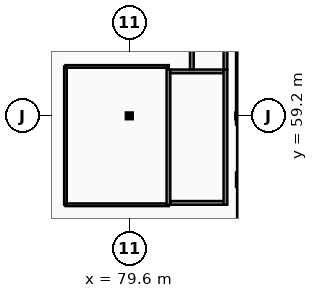
"""IFC4 building model, lengths in metres.
Left out: names, types, materials, properties, quantities, classifications, styles, units other than length and angle.
Written with IfcOpenShell. Run it as: python <this file> out.ifc"""

import sys

from ifc_helpers import new_model, si_unit, direction, frame, frame_2d, origin, origin_2d, place, context, subcontext, project, spatial, rectangle, i_section, extrude, element, fill, save


model = new_model("IFC4")
c1 = context("Model", 3, precision=1e-05, world=origin(), true_north=direction((0.0, 1.0)))
c2 = subcontext(c1, "Body", "Model", "MODEL_VIEW")
j1 = project(units=[si_unit("LENGTHUNIT", "METRE"), si_unit("PLANEANGLEUNIT", "RADIAN")], contexts=[c1])
p1 = place(None, origin())
s1 = spatial("IfcSite", under=j1, at=p1, CompositionType="ELEMENT")
p2 = place(p1, origin())
s2 = spatial("IfcBuilding", under=s1, at=p2, CompositionType="ELEMENT")
p3 = place(p2, frame((0.0, 0.0, 21.6)))
s3 = spatial("IfcBuildingStorey", under=s2, at=p3, CompositionType="ELEMENT", Elevation=21.6)
for number, where, z_axis, x_axis in (
    (1, (79.6, 59.2, 0.0), (0.0, 0.0, 1.0), (1.0, 0.0, 0.0)),
    (2, (86.8, 59.2, 0.0), (0.0, 0.0, 1.0), (1.0, 0.0, 0.0)),
):
    element("IfcColumn", number, at=place(p3, frame(where, z_axis=z_axis, x_axis=x_axis)), inside=s3, PredefinedType="COLUMN", context=c2, shape_type="SweptSolid", body=[
        extrude(i_section(OverallWidth=0.3, OverallDepth=0.29, WebThickness=0.009, FlangeThickness=0.014, at=origin_2d()), origin(), (0.0, 0.0, 1.0), 3.6),
    ])
p4 = place(p3, frame((75.4, 53.35, 0.0), z_axis=(0.0, 0.0, 1.0), x_axis=(1.0, 0.0, 0.0)))
e3 = element("IfcWall", 3, at=p4, inside=s3, PredefinedType="PARTITIONING", context=c2, shape_type="SweptSolid", body=[
    extrude(rectangle(XDim=6.8, YDim=0.18, at=frame_2d((3.4, 0.0))), origin(), (0.0, 0.0, 1.0), 2.79),
])
p5 = place(p3, frame((75.4, 53.35, 0.0), z_axis=(0.0, 0.0, 1.0), x_axis=(0.0, 1.0, 0.0)))
e4 = element("IfcWall", 4, at=p5, inside=s3, PredefinedType="PARTITIONING", context=c2, shape_type="SweptSolid", body=[
    extrude(rectangle(XDim=9.1, YDim=0.18, at=frame_2d((4.55, 0.0))), origin(), (0.0, 0.0, 1.0), 2.71),
])
p6 = place(p5, frame((4.05, 0.0, -0.01)))
e5 = element("IfcOpeningElement", 5, at=p6, cuts=e4, PredefinedType="OPENING", context=c2, shape_type="SweptSolid", body=[
    extrude(rectangle(XDim=1.0, YDim=2.16, at=frame_2d((0.5, 1.08))), frame((0.0, 0.1, 0.0), z_axis=(0.0, -1.0, 0.0), x_axis=(1.0, 0.0, 0.0)), (0.0, 0.0, 1.0), 0.2),
])
p7 = place(p3, frame((75.4, 62.45, 0.0), z_axis=(0.0, 0.0, 1.0), x_axis=(1.0, 0.0, 0.0)))
e6 = element("IfcWall", 6, at=p7, inside=s3, PredefinedType="PARTITIONING", context=c2, shape_type="SweptSolid", body=[
    extrude(rectangle(XDim=6.8, YDim=0.18, at=frame_2d((3.4, 0.0))), origin(), (0.0, 0.0, 1.0), 2.79),
])
p8 = place(p3, frame((86.8, 54.52, 0.0), z_axis=(0.0, 0.0, 1.0), x_axis=(0.0, 1.0, 0.0)))
e7 = element("IfcWall", 7, at=p8, inside=s3, PredefinedType="SOLIDWALL", context=c2, shape_type="SweptSolid", body=[
    extrude(rectangle(XDim=0.96, YDim=0.36, at=frame_2d((0.48, 0.0))), origin(), (0.0, 0.0, 1.0), 2.71),
])
p9 = place(p3, frame((86.8, 58.62, 0.0), z_axis=(0.0, 0.0, 1.0), x_axis=(0.0, 1.0, 0.0)))
e8 = element("IfcWall", 8, at=p9, inside=s3, PredefinedType="SOLIDWALL", context=c2, shape_type="SweptSolid", body=[
    extrude(rectangle(XDim=0.45, YDim=0.36, at=frame_2d((0.225, 0.0))), origin(), (0.0, 0.0, 1.0), 2.71),
])
p10 = place(p3, frame((86.8, 59.2, 0.0), z_axis=(0.0, 0.0, 1.0), x_axis=(0.0, 1.0, 0.0)))
e9 = element("IfcWall", 9, at=p10, inside=s3, PredefinedType="SOLIDWALL", context=c2, shape_type="SweptSolid", body=[
    extrude(rectangle(XDim=8.4, YDim=0.36, at=frame_2d((4.2, 0.0))), origin(), (0.0, 0.0, 1.0), 2.71),
])
p11 = place(p10, frame((0.46, 0.0, 0.75)))
e10 = element("IfcOpeningElement", 10, at=p11, cuts=e9, PredefinedType="OPENING", context=c2, shape_type="SweptSolid", body=[
    extrude(rectangle(XDim=1.55, YDim=1.82, at=frame_2d((0.775, 0.91))), frame((0.0, 0.19, 0.0), z_axis=(0.0, -1.0, 0.0), x_axis=(1.0, 0.0, 0.0)), (0.0, 0.0, 1.0), 0.38),
])
p12 = place(p10, frame((6.26, 0.0, 0.75)))
e11 = element("IfcOpeningElement", 11, at=p12, cuts=e9, PredefinedType="OPENING", context=c2, shape_type="SweptSolid", body=[
    extrude(rectangle(XDim=1.55, YDim=1.82, at=frame_2d((0.775, 0.91))), frame((0.0, 0.19, 0.0), z_axis=(0.0, -1.0, 0.0), x_axis=(1.0, 0.0, 0.0)), (0.0, 0.0, 1.0), 0.38),
])
p13 = place(p3, frame((86.8, 50.8, 3.6), z_axis=(0.0, 0.0, 1.0), x_axis=(0.0, 1.0, 0.0)))
e12 = element("IfcWall", 12, at=p13, inside=s3, PredefinedType="PARAPET", context=c2, shape_type="SweptSolid", body=[
    extrude(rectangle(XDim=25.2, YDim=0.22, at=frame_2d((12.6, 0.0))), origin(), (0.0, 0.0, 1.0), 1.2),
])
p14 = place(p3, frame((82.3, 53.475, 0.0), z_axis=(0.0, 0.0, 1.0), x_axis=(1.0, 0.0, 0.0)))
e13 = element("IfcWall", 13, at=p14, inside=s3, PredefinedType="SHEAR", context=c2, shape_type="SweptSolid", body=[
    extrude(rectangle(XDim=3.5, YDim=0.25, at=frame_2d((1.75, 0.0))), origin(), (0.0, 0.0, 1.0), 3.6),
])
p15 = place(p14, frame((1.1, 0.0, -0.01)))
e14 = element("IfcOpeningElement", 14, at=p15, cuts=e13, PredefinedType="OPENING", context=c2, shape_type="SweptSolid", body=[
    extrude(rectangle(XDim=1.3, YDim=2.16, at=frame_2d((0.65, 1.08))), frame((0.0, 0.135, 0.0), z_axis=(0.0, -1.0, 0.0), x_axis=(1.0, 0.0, 0.0)), (0.0, 0.0, 1.0), 0.27),
])
p16 = place(p3, frame((82.175, 53.35, 0.0), z_axis=(0.0, 0.0, 1.0), x_axis=(0.0, 1.0, 0.0)))
e15 = element("IfcWall", 15, at=p16, inside=s3, PredefinedType="SHEAR", context=c2, shape_type="SweptSolid", body=[
    extrude(rectangle(XDim=8.9, YDim=0.25, at=frame_2d((4.45, 0.0))), origin(), (0.0, 0.0, 1.0), 3.6),
])
p17 = place(p3, frame((85.8, 62.125, 0.0), z_axis=(0.0, 0.0, 1.0), x_axis=(-1.0, 0.0, 0.0)))
e16 = element("IfcWall", 16, at=p17, inside=s3, PredefinedType="SHEAR", context=c2, shape_type="SweptSolid", body=[
    extrude(rectangle(XDim=3.5, YDim=0.25, at=frame_2d((1.75, 0.0))), origin(), (0.0, 0.0, 1.0), 3.6),
])
p18 = place(p3, frame((85.925, 53.35, 0.0), z_axis=(0.0, 0.0, 1.0), x_axis=(0.0, 1.0, 0.0)))
e17 = element("IfcWall", 17, at=p18, inside=s3, PredefinedType="SHEAR", context=c2, shape_type="SweptSolid", body=[
    extrude(rectangle(XDim=8.9, YDim=0.25, at=frame_2d((4.45, 0.0))), origin(), (0.0, 0.0, 1.0), 3.6),
])
p19 = place(p3, frame((83.715, 62.25, 0.0), z_axis=(0.0, 0.0, 1.0), x_axis=(0.0, 1.0, 0.0)))
e18 = element("IfcWall", 18, at=p19, inside=s3, PredefinedType="SHEAR", context=c2, shape_type="SweptSolid", body=[
    extrude(rectangle(XDim=2.46, YDim=0.25, at=frame_2d((1.23, 0.0))), origin(), (0.0, 0.0, 1.0), 3.6),
])
p20 = place(p19, frame((0.68, 0.0, -0.01)))
e19 = element("IfcOpeningElement", 19, at=p20, cuts=e18, PredefinedType="OPENING", context=c2, shape_type="SweptSolid", body=[
    extrude(rectangle(XDim=1.1, YDim=2.16, at=frame_2d((0.55, 1.08))), frame((0.0, 0.135, 0.0), z_axis=(0.0, -1.0, 0.0), x_axis=(1.0, 0.0, 0.0)), (0.0, 0.0, 1.0), 0.27),
])
p21 = place(p3, frame((85.925, 62.25, 0.0), z_axis=(0.0, 0.0, 1.0), x_axis=(0.0, 1.0, 0.0)))
e20 = element("IfcWall", 20, at=p21, inside=s3, PredefinedType="SHEAR", context=c2, shape_type="SweptSolid", body=[
    extrude(rectangle(XDim=2.71, YDim=0.25, at=frame_2d((1.355, 0.0))), origin(), (0.0, 0.0, 1.0), 3.6),
])
p22 = place(p6, frame((0.0, 0.0, 0.01)))
e21 = element("IfcDoor", 21, at=p22, inside=s3, OperationType="SINGLE_SWING_RIGHT", PredefinedType="DOOR", context=c2, shape_type="SweptSolid", body=[
    extrude(rectangle(XDim=1.0, YDim=2.15, at=frame_2d((0.5, 1.075))), frame((0.0, 0.025, 0.0), z_axis=(0.0, -1.0, 0.0), x_axis=(1.0, 0.0, 0.0)), (0.0, 0.0, 1.0), 0.05),
])
fill(e5, e21)
p23 = place(p2, frame((0.0, 0.0, 25.2)))
p24 = place(p23, frame((0.0, 0.0, -0.28)))
p25 = place(p24, frame((80.5, 58.0, 0.23)))
e22 = element("IfcDoor", 22, at=p25, inside=s3, OperationType="SINGLE_SWING_LEFT", PredefinedType="TRAPDOOR", context=c2, shape_type="SweptSolid", body=[
    extrude(rectangle(XDim=1.0, YDim=1.0, at=origin_2d()), origin(), (0.0, 0.0, 1.0), 0.05),
])
p26 = place(p15, frame((1.3, 0.0, 0.01), z_axis=(0.0, 0.0, 1.0), x_axis=(-1.0, 0.0, 0.0)))
e23 = element("IfcDoor", 23, at=p26, inside=s3, OperationType="SINGLE_SWING_LEFT", PredefinedType="DOOR", context=c2, shape_type="SweptSolid", body=[
    extrude(rectangle(XDim=1.3, YDim=2.15, at=frame_2d((0.65, 1.075))), frame((0.0, 0.025, 0.0), z_axis=(0.0, -1.0, 0.0), x_axis=(1.0, 0.0, 0.0)), (0.0, 0.0, 1.0), 0.05),
])
fill(e14, e23)
p27 = place(p20, frame((0.0, 0.0, 0.01)))
e24 = element("IfcDoor", 24, at=p27, inside=s3, OperationType="SLIDING_TO_LEFT", PredefinedType="DOOR", context=c2, shape_type="SweptSolid", body=[
    extrude(rectangle(XDim=1.1, YDim=2.15, at=frame_2d((0.55, 1.075))), frame((0.0, 0.025, 0.0), z_axis=(0.0, -1.0, 0.0), x_axis=(1.0, 0.0, 0.0)), (0.0, 0.0, 1.0), 0.05),
])
fill(e19, e24)
save(model, sys.argv[1])
